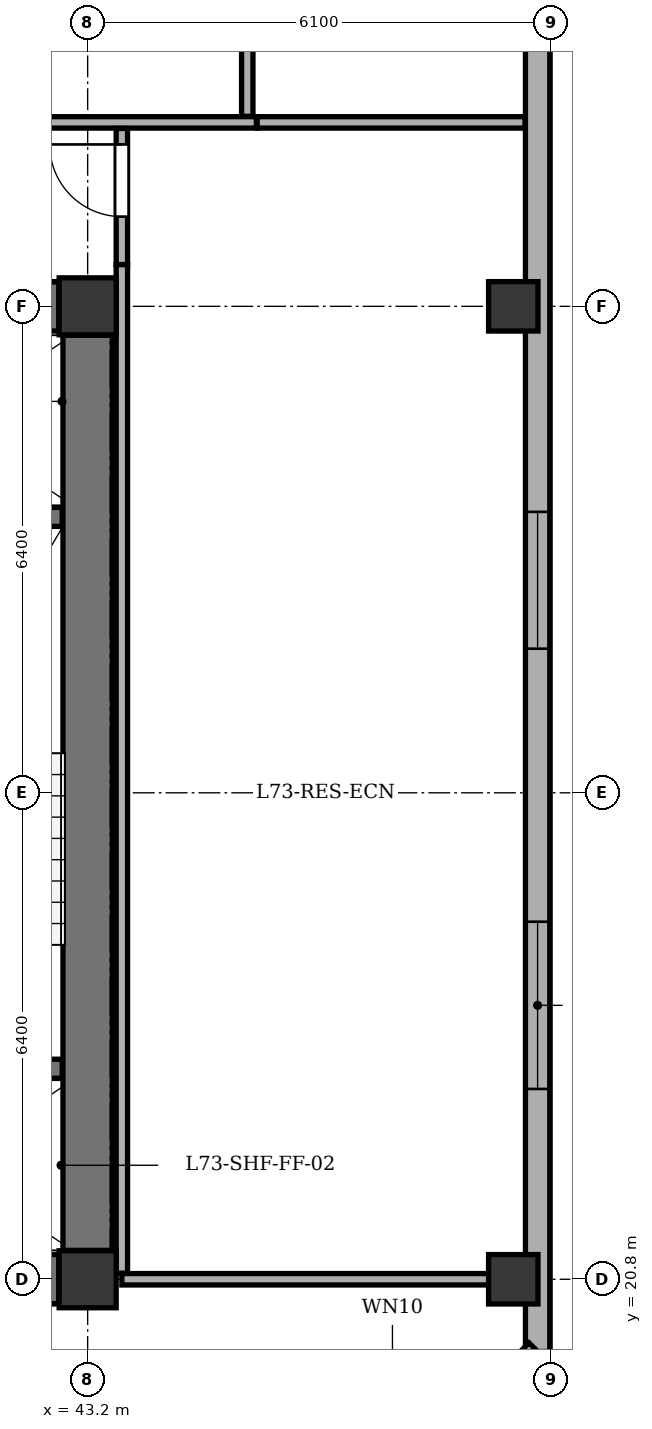
"""IFC4 building model, lengths in metres.
Left out: names, types, materials, properties, quantities, classifications, styles, units other than length and angle.
Written with IfcOpenShell. Run it as: python <this file> out.ifc"""

import sys

from ifc_helpers import new_model, si_unit, direction, frame, frame_2d, origin, origin_2d, place, context, subcontext, project, spatial, rectangle, extrude, element, fill, save


model = new_model("IFC4")
c1 = context("Model", 3, precision=1e-05, world=origin(), true_north=direction((0.0, 1.0)))
c2 = subcontext(c1, "Body", "Model", "MODEL_VIEW")
j1 = project(units=[si_unit("LENGTHUNIT", "METRE"), si_unit("PLANEANGLEUNIT", "RADIAN")], contexts=[c1])
p1 = place(None, origin())
s1 = spatial("IfcSite", under=j1, at=p1, CompositionType="ELEMENT")
p2 = place(p1, origin())
s2 = spatial("IfcBuilding", under=s1, at=p2, CompositionType="ELEMENT")
p3 = place(p2, frame((0.0, 0.0, 275.5)))
s3 = spatial("IfcBuildingStorey", under=s2, at=p3, CompositionType="ELEMENT", Elevation=275.5)
for number, where, z_axis, x_axis in (
    (1, (43.2, 20.8, 0.0), (0.0, 0.0, 1.0), (1.0, 0.0, 0.0)),
    (2, (43.2, 33.6, 0.0), (0.0, 0.0, 1.0), (1.0, 0.0, 0.0)),
):
    element("IfcColumn", number, at=place(p3, frame(where, z_axis=z_axis, x_axis=x_axis)), inside=s3, PredefinedType="COLUMN", context=c2, shape_type="SweptSolid", body=[
        extrude(rectangle(XDim=0.75, YDim=0.75, at=origin_2d()), origin(), (0.0, 0.0, 1.0), 3.4),
    ])
for number, where, z_axis, x_axis in (
    (3, (48.8, 20.8, 0.0), (0.0, 0.0, 1.0), (1.0, 0.0, 0.0)),
    (4, (48.8, 33.6, 0.0), (0.0, 0.0, 1.0), (1.0, 0.0, 0.0)),
):
    element("IfcColumn", number, at=place(p3, frame(where, z_axis=z_axis, x_axis=x_axis)), inside=s3, PredefinedType="COLUMN", context=c2, shape_type="SweptSolid", body=[
        extrude(rectangle(XDim=0.65, YDim=0.65, at=origin_2d()), origin(), (0.0, 0.0, 1.0), 3.4),
    ])
p4 = place(p3, frame((49.12, 41.1, 0.0), z_axis=(0.0, 0.0, 1.0), x_axis=(0.0, -1.0, 0.0)))
e5 = element("IfcWall", 5, at=p4, inside=s3, PredefinedType="STANDARD", context=c2, shape_type="SweptSolid", body=[
    extrude(rectangle(XDim=21.25, YDim=0.32, at=frame_2d((10.625, 0.0))), origin(), (0.0, 0.0, 1.0), 2.725),
])
p5 = place(p4, frame((1.74, 0.0, 0.75)))
e6 = element("IfcOpeningElement", 6, at=p5, cuts=e5, PredefinedType="OPENING", context=c2, shape_type="SweptSolid", body=[
    extrude(rectangle(XDim=1.8, YDim=1.7, at=frame_2d((0.9, 0.85))), frame((0.0, 0.17, 0.0), z_axis=(0.0, -1.0, 0.0), x_axis=(1.0, 0.0, 0.0)), (0.0, 0.0, 1.0), 0.34),
])
p6 = place(p4, frame((10.204, 0.0, 0.75)))
e7 = element("IfcOpeningElement", 7, at=p6, cuts=e5, PredefinedType="OPENING", context=c2, shape_type="SweptSolid", body=[
    extrude(rectangle(XDim=1.8, YDim=1.7, at=frame_2d((0.9, 0.85))), frame((0.0, 0.17, 0.0), z_axis=(0.0, -1.0, 0.0), x_axis=(1.0, 0.0, 0.0)), (0.0, 0.0, 1.0), 0.34),
])
p7 = place(p4, frame((15.596, 0.0, 0.75)))
e8 = element("IfcOpeningElement", 8, at=p7, cuts=e5, PredefinedType="OPENING", context=c2, shape_type="SweptSolid", body=[
    extrude(rectangle(XDim=2.2, YDim=1.7, at=frame_2d((1.1, 0.85))), frame((0.0, 0.17, 0.0), z_axis=(0.0, -1.0, 0.0), x_axis=(1.0, 0.0, 0.0)), (0.0, 0.0, 1.0), 0.34),
])
p8 = place(p3, frame((49.12, 19.85, 0.0), z_axis=(0.0, 0.0, 1.0), x_axis=(-0.707106781187, -0.707106781187, 0.0)))
e9 = element("IfcWall", 9, at=p8, inside=s3, PredefinedType="STANDARD", context=c2, shape_type="SweptSolid", body=[
    extrude(rectangle(XDim=5.402, YDim=0.32, at=frame_2d((2.701, 0.0))), origin(), (0.0, 0.0, 1.0), 2.725),
])
p9 = place(p8, frame((2.001, 0.0, 0.75)))
e10 = element("IfcOpeningElement", 10, at=p9, cuts=e9, PredefinedType="OPENING", context=c2, shape_type="SweptSolid", body=[
    extrude(rectangle(XDim=1.4, YDim=1.65, at=frame_2d((0.7, 0.825))), frame((0.0, 0.17, 0.0), z_axis=(0.0, -1.0, 0.0), x_axis=(1.0, 0.0, 0.0)), (0.0, 0.0, 1.0), 0.34),
])
p10 = place(p3, frame((43.2, 21.18, 0.0), z_axis=(0.0, 0.0, 1.0), x_axis=(0.0, 1.0, 0.0)))
e11 = element("IfcWall", 11, at=p10, inside=s3, PredefinedType="SHEAR", context=c2, shape_type="SweptSolid", body=[
    extrude(rectangle(XDim=12.04, YDim=0.65, at=frame_2d((6.02, 0.0))), origin(), (0.0, 0.0, 1.0), 3.1),
])
p11 = place(p3, frame((35.58, 20.8, 0.0), z_axis=(0.0, 0.0, 1.0), x_axis=(1.0, 0.0, 0.0)))
e12 = element("IfcWall", 12, at=p11, inside=s3, PredefinedType="SHEAR", context=c2, shape_type="SweptSolid", body=[
    extrude(rectangle(XDim=7.24, YDim=0.65, at=frame_2d((3.62, 0.0))), origin(), (0.0, 0.0, 1.0), 3.1),
])
p12 = place(p3, frame((35.58, 33.6, 0.0), z_axis=(0.0, 0.0, 1.0), x_axis=(1.0, 0.0, 0.0)))
e13 = element("IfcWall", 13, at=p12, inside=s3, PredefinedType="SHEAR", context=c2, shape_type="SweptSolid", body=[
    extrude(rectangle(XDim=7.24, YDim=0.65, at=frame_2d((3.62, 0.0))), origin(), (0.0, 0.0, 1.0), 3.1),
])
p13 = place(p12, frame((4.82, 0.0, 0.0)))
e14 = element("IfcOpeningElement", 14, at=p13, cuts=e13, PredefinedType="OPENING", context=c2, shape_type="SweptSolid", body=[
    extrude(rectangle(XDim=1.3, YDim=2.15, at=frame_2d((0.65, 1.075))), frame((0.0, 0.335, 0.0), z_axis=(0.0, -1.0, 0.0), x_axis=(1.0, 0.0, 0.0)), (0.0, 0.0, 1.0), 0.67),
])
p14 = place(p12, frame((2.62, 0.0, 0.0)))
e15 = element("IfcOpeningElement", 15, at=p14, cuts=e13, PredefinedType="OPENING", context=c2, shape_type="SweptSolid", body=[
    extrude(rectangle(XDim=0.85, YDim=2.02, at=frame_2d((0.425, 1.01))), frame((0.0, 0.335, 0.0), z_axis=(0.0, -1.0, 0.0), x_axis=(1.0, 0.0, 0.0)), (0.0, 0.0, 1.0), 0.67),
])
for number, where, z_axis, x_axis in (
    (16, (39.69, 23.57, 0.0), (0.0, 0.0, 1.0), (1.0, 0.0, 0.0)),
    (17, (39.69, 30.83, 0.0), (0.0, 0.0, 1.0), (1.0, 0.0, 0.0)),
):
    element("IfcWall", number, at=place(p3, frame(where, z_axis=z_axis, x_axis=x_axis)), inside=s3, PredefinedType="SHEAR", context=c2, shape_type="SweptSolid", body=[
        extrude(rectangle(XDim=3.175, YDim=0.25, at=frame_2d((1.587, 0.0))), origin(), (0.0, 0.0, 1.0), 3.1),
    ])
p15 = place(p3, frame((10.9, 36.02, 0.0), z_axis=(0.0, 0.0, 1.0), x_axis=(1.0, 0.0, 0.0)))
e18 = element("IfcWall", 18, at=p15, inside=s3, PredefinedType="PARTITIONING", context=c2, shape_type="SweptSolid", body=[
    extrude(rectangle(XDim=34.52, YDim=0.15, at=frame_2d((17.26, 0.0))), origin(), (0.0, 0.0, 1.0), 3.1),
])
p16 = place(p15, frame((5.276, 0.0, 0.0)))
e19 = element("IfcOpeningElement", 19, at=p16, cuts=e18, PredefinedType="OPENING", context=c2, shape_type="SweptSolid", body=[
    extrude(rectangle(XDim=1.0, YDim=2.1, at=frame_2d((0.5, 1.05))), frame((0.0, 0.085, 0.0), z_axis=(0.0, -1.0, 0.0), x_axis=(1.0, 0.0, 0.0)), (0.0, 0.0, 1.0), 0.17),
])
p17 = place(p15, frame((16.931, 0.0, 0.0)))
e20 = element("IfcOpeningElement", 20, at=p17, cuts=e18, PredefinedType="OPENING", context=c2, shape_type="SweptSolid", body=[
    extrude(rectangle(XDim=1.0, YDim=2.1, at=frame_2d((0.5, 1.05))), frame((0.0, 0.085, 0.0), z_axis=(0.0, -1.0, 0.0), x_axis=(1.0, 0.0, 0.0)), (0.0, 0.0, 1.0), 0.17),
])
p18 = place(p15, frame((28.415, 0.0, 0.0)))
e21 = element("IfcOpeningElement", 21, at=p18, cuts=e18, PredefinedType="OPENING", context=c2, shape_type="SweptSolid", body=[
    extrude(rectangle(XDim=1.0, YDim=2.1, at=frame_2d((0.5, 1.05))), frame((0.0, 0.085, 0.0), z_axis=(0.0, -1.0, 0.0), x_axis=(1.0, 0.0, 0.0)), (0.0, 0.0, 1.0), 0.17),
])
p19 = place(p3, frame((45.3, 36.1, 0.0), z_axis=(0.0, 0.0, 1.0), x_axis=(0.0, 1.0, 0.0)))
e22 = element("IfcWall", 22, at=p19, inside=s3, PredefinedType="PARTITIONING", context=c2, shape_type="SweptSolid", body=[
    extrude(rectangle(XDim=8.655, YDim=0.15, at=frame_2d((4.327, 0.0))), origin(), (0.0, 0.0, 1.0), 3.1),
])
p20 = place(p3, frame((43.65, 20.8, 0.0), z_axis=(0.0, 0.0, 1.0), x_axis=(1.0, 0.0, 0.0)))
e23 = element("IfcWall", 23, at=p20, inside=s3, PredefinedType="PARTITIONING", context=c2, shape_type="SweptSolid", body=[
    extrude(rectangle(XDim=5.305, YDim=0.15, at=frame_2d((2.653, 0.0))), origin(), (0.0, 0.0, 1.0), 2.535),
])
p21 = place(p3, frame((45.43, 36.02, 0.0), z_axis=(0.0, 0.0, 1.0), x_axis=(1.0, 0.0, 0.0)))
e24 = element("IfcWall", 24, at=p21, inside=s3, PredefinedType="PARTITIONING", context=c2, shape_type="SweptSolid", body=[
    extrude(rectangle(XDim=3.525, YDim=0.15, at=frame_2d((1.763, 0.0))), origin(), (0.0, 0.0, 1.0), 3.1),
])
p22 = place(p3, frame((43.65, 20.88, 0.0), z_axis=(0.0, 0.0, 1.0), x_axis=(0.0, 1.0, 0.0)))
e25 = element("IfcWall", 25, at=p22, inside=s3, PredefinedType="PARTITIONING", context=c2, shape_type="SweptSolid", body=[
    extrude(rectangle(XDim=13.27, YDim=0.15, at=frame_2d((6.635, 0.0))), origin(), (0.0, 0.0, 1.0), 3.1),
])
p23 = place(p3, frame((43.65, 34.15, 0.0), z_axis=(0.0, 0.0, 1.0), x_axis=(0.0, 1.0, 0.0)))
e26 = element("IfcWall", 26, at=p23, inside=s3, PredefinedType="PARTITIONING", context=c2, shape_type="SweptSolid", body=[
    extrude(rectangle(XDim=1.79, YDim=0.15, at=frame_2d((0.895, 0.0))), origin(), (0.0, 0.0, 1.0), 3.1),
])
p24 = place(p23, frame((0.63, 0.0, 0.0)))
e27 = element("IfcOpeningElement", 27, at=p24, cuts=e26, PredefinedType="OPENING", context=c2, shape_type="SweptSolid", body=[
    extrude(rectangle(XDim=0.95, YDim=2.1, at=frame_2d((0.475, 1.05))), frame((0.0, 0.085, 0.0), z_axis=(0.0, -1.0, 0.0), x_axis=(1.0, 0.0, 0.0)), (0.0, 0.0, 1.0), 0.17),
])
p25 = place(p6, origin())
e28 = element("IfcWindow", 28, at=p25, inside=s3, PartitioningType="SINGLE_PANEL", PredefinedType="WINDOW", context=c2, shape_type="SweptSolid", body=[
    extrude(rectangle(XDim=1.8, YDim=1.7, at=frame_2d((0.9, 0.85))), frame((0.0, -0.01, 0.0), z_axis=(0.0, -1.0, 0.0), x_axis=(1.0, 0.0, 0.0)), (0.0, 0.0, 1.0), 0.06),
])
fill(e7, e28)
p26 = place(p7, origin())
e29 = element("IfcWindow", 29, at=p26, inside=s3, PartitioningType="SINGLE_PANEL", PredefinedType="WINDOW", context=c2, shape_type="SweptSolid", body=[
    extrude(rectangle(XDim=2.2, YDim=1.7, at=frame_2d((1.1, 0.85))), frame((0.0, -0.01, 0.0), z_axis=(0.0, -1.0, 0.0), x_axis=(1.0, 0.0, 0.0)), (0.0, 0.0, 1.0), 0.06),
])
fill(e8, e29)
p27 = place(p24, origin())
e30 = element("IfcDoor", 30, at=p27, inside=s3, OperationType="SINGLE_SWING_RIGHT", PredefinedType="DOOR", context=c2, shape_type="SweptSolid", body=[
    extrude(rectangle(XDim=0.95, YDim=2.1, at=frame_2d((0.475, 1.05))), frame((0.0, 0.025, 0.0), z_axis=(0.0, -1.0, 0.0), x_axis=(1.0, 0.0, 0.0)), (0.0, 0.0, 1.0), 0.05),
])
fill(e27, e30)
save(model, sys.argv[1])
